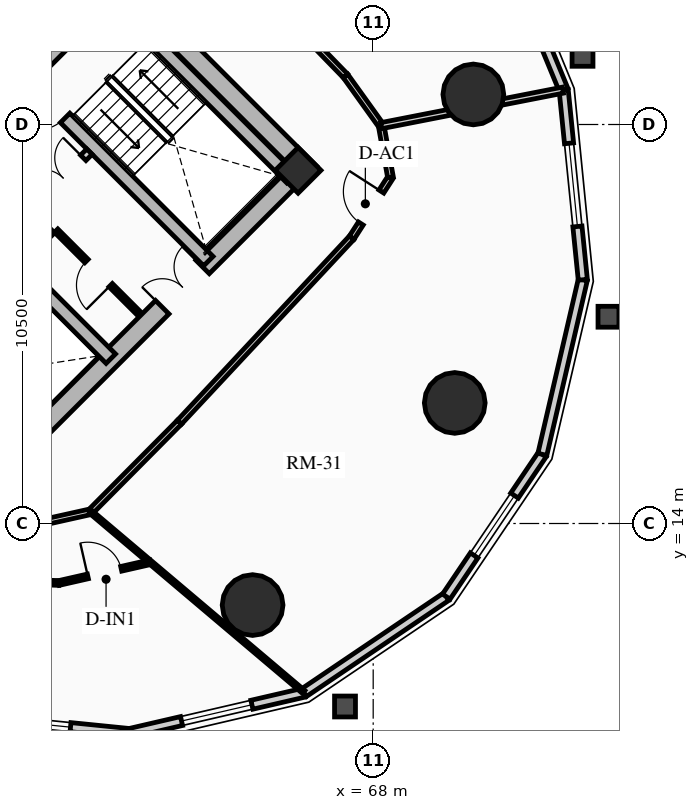
"""IFC4 building model, lengths in metres.
Left out: names, types, materials, properties, quantities, classifications, styles, units other than length and angle.
Written with IfcOpenShell. Run it as: python <this file> out.ifc"""

import sys

from ifc_helpers import new_model, si_unit, direction, frame, frame_2d, origin, origin_2d, place, context, subcontext, project, spatial, rectangle, circle, extrude, source, transform, mapped, element, fill, save


model = new_model("IFC4")
c1 = context("Model", 3, precision=1e-05, world=origin(), true_north=direction((0.0, 1.0)))
c2 = subcontext(c1, "Body", "Model", "MODEL_VIEW")
j1 = project(units=[si_unit("LENGTHUNIT", "METRE"), si_unit("PLANEANGLEUNIT", "RADIAN")], contexts=[c1])
p1 = place(None, origin())
s1 = spatial("IfcSite", under=j1, at=p1, CompositionType="ELEMENT")
p2 = place(p1, origin())
s2 = spatial("IfcBuilding", under=s1, at=p2, CompositionType="ELEMENT")
p3 = place(p2, frame((0.0, 0.0, 27.82)))
s3 = spatial("IfcBuildingStorey", under=s2, at=p3, CompositionType="ELEMENT", Elevation=27.82)
p4 = place(p3, frame((66.339, 23.227, 0.0), z_axis=(0.0, 0.0, 1.0), x_axis=(-0.707106781187, 0.707106781187, 0.0)))
e1 = element("IfcWall", 1, at=p4, inside=s3, PredefinedType="SHEAR", context=c2, shape_type="SweptSolid", body=[
    extrude(rectangle(XDim=14.3, YDim=0.5, at=frame_2d((7.15, 0.0))), origin(), (0.0, 0.0, 1.0), 2.91),
])
p5 = place(p3, frame((58.596, 15.838, 0.0), z_axis=(0.0, 0.0, 1.0), x_axis=(0.707106781187, 0.707106781187, 0.0)))
e2 = element("IfcWall", 2, at=p5, inside=s3, PredefinedType="SHEAR", context=c2, shape_type="SweptSolid", body=[
    extrude(rectangle(XDim=10.7, YDim=0.5, at=frame_2d((5.35, 0.0))), origin(), (0.0, 0.0, 1.0), 2.91),
])
m1 = source(origin(), c2, "Body", "SweptSolid", [
    extrude(rectangle(XDim=1.5, YDim=2.02, at=frame_2d((0.75, 1.01))), frame((0.0, 0.26, 0.0), z_axis=(0.0, -1.0, 0.0), x_axis=(1.0, 0.0, 0.0)), (0.0, 0.0, 1.0), 0.52),
])
p6 = place(p5, frame((5.45, 0.0, 0.0)))
e3 = element("IfcOpeningElement", 3, at=p6, cuts=e2, PredefinedType="OPENING", context=c2, shape_type="MappedRepresentation", body=[
    mapped(m1, transform((0.0, 0.0, 0.0), x_axis=(1.0, 0.0, 0.0), y_axis=(0.0, 1.0, 0.0), z_axis=(0.0, 0.0, 1.0), scale=1.0)),
])
p7 = place(p3, frame((61.096, 18.338, 0.0), z_axis=(0.0, 0.0, 1.0), x_axis=(-0.707106781187, 0.707106781187, 0.0)))
e4 = element("IfcWall", 4, at=p7, inside=s3, PredefinedType="SHEAR", context=c2, shape_type="SweptSolid", body=[
    extrude(rectangle(XDim=13.8, YDim=0.35, at=frame_2d((6.9, 0.0))), origin(), (0.0, 0.0, 1.0), 2.91),
])
m2 = source(origin(), c2, "Body", "SweptSolid", [
    extrude(rectangle(XDim=1.1, YDim=2.015, at=frame_2d((0.55, 1.007))), frame((0.0, 0.185, 0.0), z_axis=(0.0, -1.0, 0.0), x_axis=(1.0, 0.0, 0.0)), (0.0, 0.0, 1.0), 0.37),
])
p8 = place(p7, frame((4.9, 0.0, 0.0)))
e5 = element("IfcOpeningElement", 5, at=p8, cuts=e4, PredefinedType="OPENING", context=c2, shape_type="MappedRepresentation", body=[
    mapped(m2, transform((0.0, 0.0, 0.0), x_axis=(1.0, 0.0, 0.0), y_axis=(0.0, 1.0, 0.0), z_axis=(0.0, 0.0, 1.0), scale=1.0)),
])
m3 = source(origin(), c2, "Body", "SweptSolid", [
    extrude(rectangle(XDim=1.15, YDim=2.02, at=frame_2d((0.575, 1.01))), frame((0.0, 0.185, 0.0), z_axis=(0.0, -1.0, 0.0), x_axis=(1.0, 0.0, 0.0)), (0.0, 0.0, 1.0), 0.37),
])
p9 = place(p7, frame((7.32, 0.0, 0.0)))
e6 = element("IfcOpeningElement", 6, at=p9, cuts=e4, PredefinedType="OPENING", context=c2, shape_type="MappedRepresentation", body=[
    mapped(m3, transform((0.0, 0.0, 0.0), x_axis=(1.0, 0.0, 0.0), y_axis=(0.0, 1.0, 0.0), z_axis=(0.0, 0.0, 1.0), scale=1.0)),
])
p10 = place(p3, frame((63.662, 20.904, 0.0), z_axis=(0.0, 0.0, 1.0), x_axis=(-0.707106781187, 0.707106781187, 0.0)))
e7 = element("IfcWall", 7, at=p10, inside=s3, PredefinedType="SHEAR", context=c2, shape_type="SweptSolid", body=[
    extrude(rectangle(XDim=13.8, YDim=0.35, at=frame_2d((6.9, 0.0))), origin(), (0.0, 0.0, 1.0), 2.91),
])
p11 = place(p10, frame((10.025, 0.0, 0.0)))
e8 = element("IfcOpeningElement", 8, at=p11, cuts=e7, PredefinedType="OPENING", context=c2, shape_type="MappedRepresentation", body=[
    mapped(m2, transform((0.0, 0.0, 0.0), x_axis=(1.0, 0.0, 0.0), y_axis=(0.0, 1.0, 0.0), z_axis=(0.0, 0.0, 1.0), scale=1.0)),
])
p12 = place(p10, frame((12.025, 0.0, 0.0)))
e9 = element("IfcOpeningElement", 9, at=p12, cuts=e7, PredefinedType="OPENING", context=c2, shape_type="MappedRepresentation", body=[
    mapped(m2, transform((0.0, 0.0, 0.0), x_axis=(1.0, 0.0, 0.0), y_axis=(0.0, 1.0, 0.0), z_axis=(0.0, 0.0, 1.0), scale=1.0)),
])
p13 = place(p10, frame((5.33, 0.0, 0.0)))
e10 = element("IfcOpeningElement", 10, at=p13, cuts=e7, PredefinedType="OPENING", context=c2, shape_type="MappedRepresentation", body=[
    mapped(m3, transform((0.0, 0.0, 0.0), x_axis=(1.0, 0.0, 0.0), y_axis=(0.0, 1.0, 0.0), z_axis=(0.0, 0.0, 1.0), scale=1.0)),
])
p14 = place(p3, frame((65.847, 23.089, 0.0), z_axis=(0.0, 0.0, 1.0), x_axis=(-0.707106781187, 0.707106781187, 0.0)))
e11 = element("IfcWall", 11, at=p14, inside=s3, PredefinedType="SHEAR", context=c2, shape_type="SweptSolid", body=[
    extrude(rectangle(XDim=6.745, YDim=0.35, at=frame_2d((3.373, 0.0))), origin(), (0.0, 0.0, 1.0), 2.91),
])
p15 = place(p3, frame((58.893, 25.674, 0.0), z_axis=(0.0, 0.0, 1.0), x_axis=(0.707106781187, 0.707106781187, 0.0)))
e12 = element("IfcWall", 12, at=p15, inside=s3, PredefinedType="SHEAR", context=c2, shape_type="SweptSolid", body=[
    extrude(rectangle(XDim=3.285, YDim=0.35, at=frame_2d((1.643, 0.0))), origin(), (0.0, 0.0, 1.0), 2.91),
])
p16 = place(p3, frame((66.024, 23.294, 0.0), z_axis=(0.0, 0.0, 1.0), x_axis=(0.707106781187, 0.707106781187, 0.0)))
e13 = element("IfcColumn", 13, at=p16, inside=s3, PredefinedType="COLUMN", context=c2, shape_type="SweptSolid", body=[
    extrude(rectangle(XDim=0.85, YDim=0.85, at=origin_2d()), origin(), (0.0, 0.0, 1.0), 2.91),
])
for number, where, z_axis, x_axis in (
    (14, (64.827, 11.854, 0.0), (0.0, 0.0, 1.0), (1.0, 0.0, 0.0)),
    (15, (70.146, 17.173, 0.0), (0.0, 0.0, 1.0), (1.0, 0.0, 0.0)),
    (16, (70.635, 25.291, 0.0), (0.0, 0.0, 1.0), (1.0, 0.0, 0.0)),
):
    element("IfcColumn", number, at=place(p3, frame(where, z_axis=z_axis, x_axis=x_axis)), inside=s3, PredefinedType="USERDEFINED", context=c2, shape_type="SweptSolid", body=[
        extrude(circle(Radius=0.8, at=origin_2d()), origin(), (0.0, 0.0, 1.0), 2.91),
    ])
p17 = place(p3, frame((61.586, 8.484, 0.0), z_axis=(0.0, 0.0, 1.0), x_axis=(-0.994951574538, 0.100356187272, 0.0)))
e17 = element("IfcWall", 17, at=p17, inside=s3, PredefinedType="SOLIDWALL", context=c2, shape_type="SweptSolid", body=[
    extrude(rectangle(XDim=5.019, YDim=0.24, at=frame_2d((2.509, 0.0))), origin(), (0.0, 0.0, 1.0), 2.635),
])
m4 = source(origin(), c2, "Body", "SweptSolid", [
    extrude(rectangle(XDim=1.9, YDim=1.35, at=frame_2d((0.95, 0.675))), frame((0.0, 0.13, 0.0), z_axis=(0.0, -1.0, 0.0), x_axis=(1.0, 0.0, 0.0)), (0.0, 0.0, 1.0), 0.26),
])
p18 = place(p17, frame((1.559, 0.0, 0.65)))
e18 = element("IfcOpeningElement", 18, at=p18, cuts=e17, PredefinedType="OPENING", context=c2, shape_type="MappedRepresentation", body=[
    mapped(m4, transform((0.0, 0.0, 0.0), x_axis=(1.0, 0.0, 0.0), y_axis=(0.0, 1.0, 0.0), z_axis=(0.0, 0.0, 1.0), scale=1.0)),
])
p19 = place(p3, frame((66.18, 9.548, 0.0), z_axis=(0.0, 0.0, 1.0), x_axis=(-0.974197104074, -0.225698919833, 0.0)))
e19 = element("IfcWall", 19, at=p19, inside=s3, PredefinedType="SOLIDWALL", context=c2, shape_type="SweptSolid", body=[
    extrude(rectangle(XDim=4.715, YDim=0.24, at=frame_2d((2.357, 0.0))), origin(), (0.0, 0.0, 1.0), 2.635),
])
p20 = place(p19, frame((1.408, 0.0, 0.65)))
e20 = element("IfcOpeningElement", 20, at=p20, cuts=e19, PredefinedType="OPENING", context=c2, shape_type="MappedRepresentation", body=[
    mapped(m4, transform((0.0, 0.0, 0.0), x_axis=(1.0, 0.0, 0.0), y_axis=(0.0, 1.0, 0.0), z_axis=(0.0, 0.0, 1.0), scale=1.0)),
])
p21 = place(p3, frame((69.924, 12.076, 0.0), z_axis=(0.0, 0.0, 1.0), x_axis=(-0.828776615238, -0.559579594012, 0.0)))
e21 = element("IfcWall", 21, at=p21, inside=s3, PredefinedType="SOLIDWALL", context=c2, shape_type="SweptSolid", body=[
    extrude(rectangle(XDim=4.517, YDim=0.24, at=frame_2d((2.259, 0.0))), origin(), (0.0, 0.0, 1.0), 2.635),
])
p22 = place(p3, frame((72.452, 15.82, 0.0), z_axis=(0.0, 0.0, 1.0), x_axis=(-0.559579594012, -0.828776615238, 0.0)))
e22 = element("IfcWall", 22, at=p22, inside=s3, PredefinedType="SOLIDWALL", context=c2, shape_type="SweptSolid", body=[
    extrude(rectangle(XDim=4.517, YDim=0.24, at=frame_2d((2.259, 0.0))), origin(), (0.0, 0.0, 1.0), 2.635),
])
p23 = place(p22, frame((1.309, 0.0, 0.65)))
e23 = element("IfcOpeningElement", 23, at=p23, cuts=e22, PredefinedType="OPENING", context=c2, shape_type="MappedRepresentation", body=[
    mapped(m4, transform((0.0, 0.0, 0.0), x_axis=(1.0, 0.0, 0.0), y_axis=(0.0, 1.0, 0.0), z_axis=(0.0, 0.0, 1.0), scale=1.0)),
])
p24 = place(p3, frame((73.516, 20.414, 0.0), z_axis=(0.0, 0.0, 1.0), x_axis=(-0.225698919833, -0.974197104074, 0.0)))
e24 = element("IfcWall", 24, at=p24, inside=s3, PredefinedType="SOLIDWALL", context=c2, shape_type="SweptSolid", body=[
    extrude(rectangle(XDim=4.715, YDim=0.24, at=frame_2d((2.357, 0.0))), origin(), (0.0, 0.0, 1.0), 2.635),
])
p25 = place(p3, frame((73.012, 25.407, 0.0), z_axis=(0.0, 0.0, 1.0), x_axis=(0.100356187272, -0.994951574538, 0.0)))
e25 = element("IfcWall", 25, at=p25, inside=s3, PredefinedType="SOLIDWALL", context=c2, shape_type="SweptSolid", body=[
    extrude(rectangle(XDim=5.019, YDim=0.24, at=frame_2d((2.509, 0.0))), origin(), (0.0, 0.0, 1.0), 2.635),
])
m5 = source(origin(), c2, "Body", "SweptSolid", [
    extrude(rectangle(XDim=2.2, YDim=1.35, at=frame_2d((1.1, 0.675))), frame((0.0, 0.13, 0.0), z_axis=(0.0, -1.0, 0.0), x_axis=(1.0, 0.0, 0.0)), (0.0, 0.0, 1.0), 0.26),
])
p26 = place(p25, frame((1.409, 0.0, 0.65)))
e26 = element("IfcOpeningElement", 26, at=p26, cuts=e25, PredefinedType="OPENING", context=c2, shape_type="MappedRepresentation", body=[
    mapped(m5, transform((0.0, 0.0, 0.0), x_axis=(1.0, 0.0, 0.0), y_axis=(0.0, 1.0, 0.0), z_axis=(0.0, 0.0, 1.0), scale=1.0)),
])
p27 = place(p3, frame((70.99, 30.312, 0.0), z_axis=(0.0, 0.0, 1.0), x_axis=(0.381113147118, -0.924528403616, 0.0)))
e27 = element("IfcWall", 27, at=p27, inside=s3, PredefinedType="SOLIDWALL", context=c2, shape_type="SweptSolid", body=[
    extrude(rectangle(XDim=5.305, YDim=0.24, at=frame_2d((2.653, 0.0))), origin(), (0.0, 0.0, 1.0), 2.635),
])
p28 = place(p3, frame((58.214, 21.467, 0.0), z_axis=(0.0, 0.0, 1.0), x_axis=(0.707106781187, 0.707106781187, 0.0)))
e28 = element("IfcWall", 28, at=p28, inside=s3, PredefinedType="PARTITIONING", context=c2, shape_type="SweptSolid", body=[
    extrude(rectangle(XDim=3.28, YDim=0.2, at=frame_2d((1.64, 0.0))), origin(), (0.0, 0.0, 1.0), 2.635),
])
m6 = source(origin(), c2, "Body", "SweptSolid", [
    extrude(rectangle(XDim=1.5, YDim=2.02, at=frame_2d((0.75, 1.01))), frame((0.0, 0.11, 0.0), z_axis=(0.0, -1.0, 0.0), x_axis=(1.0, 0.0, 0.0)), (0.0, 0.0, 1.0), 0.22),
])
p29 = place(p28, frame((1.55, 0.0, 0.0)))
e29 = element("IfcOpeningElement", 29, at=p29, cuts=e28, PredefinedType="OPENING", context=c2, shape_type="MappedRepresentation", body=[
    mapped(m6, transform((0.0, 0.0, 0.0), x_axis=(1.0, 0.0, 0.0), y_axis=(0.0, 1.0, 0.0), z_axis=(0.0, 0.0, 1.0), scale=1.0)),
])
p30 = place(p3, frame((61.835, 19.529, 0.0), z_axis=(0.0, 0.0, 1.0), x_axis=(-0.707146413884, 0.707067146267, 0.0)))
e30 = element("IfcWall", 30, at=p30, inside=s3, PredefinedType="PARTITIONING", context=c2, shape_type="SweptSolid", body=[
    extrude(rectangle(XDim=3.08, YDim=0.125, at=frame_2d((1.54, 0.0))), origin(), (0.0, 0.0, 1.0), 2.635),
])
m7 = source(origin(), c2, "Body", "SweptSolid", [
    extrude(rectangle(XDim=0.9, YDim=2.005, at=frame_2d((0.45, 1.002))), frame((0.0, 0.073, 0.0), z_axis=(0.0, -1.0, 0.0), x_axis=(1.0, 0.0, 0.0)), (0.0, 0.0, 1.0), 0.145),
])
p31 = place(p30, frame((1.05, 0.0, 0.0)))
e31 = element("IfcOpeningElement", 31, at=p31, cuts=e30, PredefinedType="OPENING", context=c2, shape_type="MappedRepresentation", body=[
    mapped(m7, transform((0.0, 0.0, 0.0), x_axis=(1.0, 0.0, 0.0), y_axis=(0.0, 1.0, 0.0), z_axis=(0.0, 0.0, 1.0), scale=1.0)),
])
p32 = place(p3, frame((58.794, 20.915, 0.0), z_axis=(0.0, 0.0, 1.0), x_axis=(0.707106781187, 0.707106781187, 0.0)))
e32 = element("IfcWall", 32, at=p32, inside=s3, PredefinedType="PARTITIONING", context=c2, shape_type="SweptSolid", body=[
    extrude(rectangle(XDim=1.1, YDim=0.125, at=frame_2d((0.55, 0.0))), origin(), (0.0, 0.0, 1.0), 2.635),
])
p33 = place(p3, frame((59.008, 13.963, 0.0), z_axis=(0.0, 0.0, 1.0), x_axis=(0.976020856791, 0.21767702476, 0.0)))
e33 = element("IfcWall", 33, at=p33, inside=s3, PredefinedType="PARTITIONING", context=c2, shape_type="SweptSolid", body=[
    extrude(rectangle(XDim=1.593, YDim=0.15, at=frame_2d((0.796, 0.0))), origin(), (0.0, 0.0, 1.0), 2.205),
])
p34 = place(p3, frame((60.562, 14.31, 0.0), z_axis=(0.0, 0.0, 1.0), x_axis=(0.704566236161, 0.709638230975, 0.0)))
e34 = element("IfcWall", 34, at=p34, inside=s3, PredefinedType="PARTITIONING", context=c2, shape_type="SweptSolid", body=[
    extrude(rectangle(XDim=3.321, YDim=0.15, at=frame_2d((1.661, 0.0))), origin(), (0.0, 0.0, 1.0), 2.159),
])
p35 = place(p3, frame((62.903, 16.667, 0.0), z_axis=(0.0, 0.0, 1.0), x_axis=(0.682371947497, 0.731005147225, 0.0)))
e35 = element("IfcWall", 35, at=p35, inside=s3, PredefinedType="PARTITIONING", context=c2, shape_type="SweptSolid", body=[
    extrude(rectangle(XDim=6.642, YDim=0.15, at=frame_2d((3.321, 0.0))), origin(), (0.0, 0.0, 1.0), 2.159),
])
p36 = place(p3, frame((67.435, 21.521, 0.0), z_axis=(0.0, 0.0, 1.0), x_axis=(0.540777197838, 0.841165870859, 0.0)))
e36 = element("IfcWall", 36, at=p36, inside=s3, PredefinedType="PARTITIONING", context=c2, shape_type="SweptSolid", body=[
    extrude(rectangle(XDim=1.888, YDim=0.15, at=frame_2d((0.944, 0.0))), origin(), (0.0, 0.0, 1.0), 2.205),
])
m8 = source(origin(), c2, "Body", "SweptSolid", [
    extrude(rectangle(XDim=1.0, YDim=2.015, at=frame_2d((0.5, 1.007))), frame((0.0, 0.085, 0.0), z_axis=(0.0, -1.0, 0.0), x_axis=(1.0, 0.0, 0.0)), (0.0, 0.0, 1.0), 0.17),
])
p37 = place(p36, frame((0.444, 0.0, 0.0)))
e37 = element("IfcOpeningElement", 37, at=p37, cuts=e36, PredefinedType="OPENING", context=c2, shape_type="MappedRepresentation", body=[
    mapped(m8, transform((0.0, 0.0, 0.0), x_axis=(1.0, 0.0, 0.0), y_axis=(0.0, 1.0, 0.0), z_axis=(0.0, 0.0, 1.0), scale=1.0)),
])
p38 = place(p3, frame((68.456, 23.11, 0.0), z_axis=(0.0, 0.0, 1.0), x_axis=(-0.1772522795, 0.984165448191, 0.0)))
e38 = element("IfcWall", 38, at=p38, inside=s3, PredefinedType="PARTITIONING", context=c2, shape_type="SweptSolid", body=[
    extrude(rectangle(XDim=1.382, YDim=0.15, at=frame_2d((0.691, 0.0))), origin(), (0.0, 0.0, 1.0), 2.159),
])
p39 = place(p3, frame((68.211, 24.469, 0.0), z_axis=(0.0, 0.0, 1.0), x_axis=(-0.583012141368, 0.812463441034, 0.0)))
e39 = element("IfcWall", 39, at=p39, inside=s3, PredefinedType="PARTITIONING", context=c2, shape_type="SweptSolid", body=[
    extrude(rectangle(XDim=1.613, YDim=0.15, at=frame_2d((0.807, 0.0))), origin(), (0.0, 0.0, 1.0), 2.205),
])
p40 = place(p3, frame((67.27, 25.78, 0.0), z_axis=(0.0, 0.0, 1.0), x_axis=(-0.696847842907, 0.717218992942, 0.0)))
e40 = element("IfcWall", 40, at=p40, inside=s3, PredefinedType="PARTITIONING", context=c2, shape_type="SweptSolid", body=[
    extrude(rectangle(XDim=6.004, YDim=0.15, at=frame_2d((3.002, 0.0))), origin(), (0.0, 0.0, 1.0), 2.635),
])
p41 = place(p3, frame((60.562, 14.31, 0.0), z_axis=(0.0, 0.0, 1.0), x_axis=(0.763547638675, -0.645751502881, 0.0)))
e41 = element("IfcWall", 41, at=p41, inside=s3, PredefinedType="MOVABLE", context=c2, shape_type="SweptSolid", body=[
    extrude(rectangle(XDim=7.345, YDim=0.1, at=frame_2d((3.673, 0.0))), origin(), (0.0, 0.0, 1.0), 2.073),
])
p42 = place(p3, frame((68.211, 24.469, 0.0), z_axis=(0.0, 0.0, 1.0), x_axis=(0.981421381452, 0.19186472325, 0.0)))
e42 = element("IfcWall", 42, at=p42, inside=s3, PredefinedType="PARTITIONING", context=c2, shape_type="SweptSolid", body=[
    extrude(rectangle(XDim=4.872, YDim=0.16, at=frame_2d((2.436, 0.0))), origin(), (0.0, 0.0, 1.0), 2.073),
])
p43 = place(p3, frame((57.255, 12.528, 0.0), z_axis=(0.0, 0.0, 1.0), x_axis=(0.999290303909, -0.037668136579, 0.0)))
e43 = element("IfcWall", 43, at=p43, inside=s3, PredefinedType="PARTITIONING", context=c2, shape_type="SweptSolid", body=[
    extrude(rectangle(XDim=2.476, YDim=0.125, at=frame_2d((1.238, 0.0))), origin(), (0.0, 0.0, 1.0), 2.159),
])
p44 = place(p3, frame((59.729, 12.434, 0.0), z_axis=(0.0, 0.0, 1.0), x_axis=(0.975062765266, 0.221929276555, 0.0)))
e44 = element("IfcWall", 44, at=p44, inside=s3, PredefinedType="PARTITIONING", context=c2, shape_type="SweptSolid", body=[
    extrude(rectangle(XDim=2.465, YDim=0.125, at=frame_2d((1.233, 0.0))), origin(), (0.0, 0.0, 1.0), 2.205),
])
p45 = place(p44, frame((0.783, 0.0, 0.0)))
e45 = element("IfcOpeningElement", 45, at=p45, cuts=e44, PredefinedType="OPENING", context=c2, shape_type="MappedRepresentation", body=[
    mapped(m7, transform((0.0, 0.0, 0.0), x_axis=(1.0, 0.0, 0.0), y_axis=(0.0, 1.0, 0.0), z_axis=(0.0, 0.0, 1.0), scale=1.0)),
])
m9 = source(origin(), c2, "Body", "SweptSolid", [
    extrude(rectangle(XDim=1.9, YDim=1.35, at=frame_2d((0.95, 0.675))), frame((0.0, 0.03, 0.0), z_axis=(0.0, -1.0, 0.0), x_axis=(1.0, 0.0, 0.0)), (0.0, 0.0, 1.0), 0.06),
])
p46 = place(p18, origin())
e46 = element("IfcWindow", 46, at=p46, inside=s3, PartitioningType="DOUBLE_PANEL_VERTICAL", PredefinedType="WINDOW", context=c2, shape_type="MappedRepresentation", body=[
    mapped(m9, transform((0.0, 0.0, 0.0), x_axis=(1.0, 0.0, 0.0), y_axis=(0.0, 1.0, 0.0), z_axis=(0.0, 0.0, 1.0), scale=1.0)),
])
fill(e18, e46)
p47 = place(p20, origin())
e47 = element("IfcWindow", 47, at=p47, inside=s3, PartitioningType="DOUBLE_PANEL_VERTICAL", PredefinedType="WINDOW", context=c2, shape_type="MappedRepresentation", body=[
    mapped(m9, transform((0.0, 0.0, 0.0), x_axis=(1.0, 0.0, 0.0), y_axis=(0.0, 1.0, 0.0), z_axis=(0.0, 0.0, 1.0), scale=1.0)),
])
fill(e20, e47)
p48 = place(p23, origin())
e48 = element("IfcWindow", 48, at=p48, inside=s3, PartitioningType="DOUBLE_PANEL_VERTICAL", PredefinedType="WINDOW", context=c2, shape_type="MappedRepresentation", body=[
    mapped(m9, transform((0.0, 0.0, 0.0), x_axis=(1.0, 0.0, 0.0), y_axis=(0.0, 1.0, 0.0), z_axis=(0.0, 0.0, 1.0), scale=1.0)),
])
fill(e23, e48)
m10 = source(origin(), c2, "Body", "SweptSolid", [
    extrude(rectangle(XDim=2.2, YDim=1.35, at=frame_2d((1.1, 0.675))), frame((0.0, 0.03, 0.0), z_axis=(0.0, -1.0, 0.0), x_axis=(1.0, 0.0, 0.0)), (0.0, 0.0, 1.0), 0.06),
])
p49 = place(p26, origin())
e49 = element("IfcWindow", 49, at=p49, inside=s3, PartitioningType="DOUBLE_PANEL_VERTICAL", PredefinedType="WINDOW", context=c2, shape_type="MappedRepresentation", body=[
    mapped(m10, transform((0.0, 0.0, 0.0), x_axis=(1.0, 0.0, 0.0), y_axis=(0.0, 1.0, 0.0), z_axis=(0.0, 0.0, 1.0), scale=1.0)),
])
fill(e26, e49)
m11 = source(origin(), c2, "Body", "SweptSolid", [
    extrude(rectangle(XDim=1.15, YDim=2.02, at=frame_2d((0.575, 1.01))), frame((0.0, 0.025, 0.0), z_axis=(0.0, -1.0, 0.0), x_axis=(1.0, 0.0, 0.0)), (0.0, 0.0, 1.0), 0.05),
])
p50 = place(p13, origin())
e50 = element("IfcDoor", 50, at=p50, inside=s3, OperationType="SINGLE_SWING_RIGHT", PredefinedType="DOOR", context=c2, shape_type="MappedRepresentation", body=[
    mapped(m11, transform((0.0, 0.0, 0.0), x_axis=(1.0, 0.0, 0.0), y_axis=(0.0, 1.0, 0.0), z_axis=(0.0, 0.0, 1.0), scale=1.0)),
])
fill(e10, e50)
m12 = source(origin(), c2, "Body", "SweptSolid", [
    extrude(rectangle(XDim=1.5, YDim=2.02, at=frame_2d((0.75, 1.01))), frame((0.0, 0.025, 0.0), z_axis=(0.0, -1.0, 0.0), x_axis=(1.0, 0.0, 0.0)), (0.0, 0.0, 1.0), 0.05),
])
p51 = place(p6, origin())
e51 = element("IfcDoor", 51, at=p51, inside=s3, OperationType="DOUBLE_DOOR_SINGLE_SWING", PredefinedType="DOOR", context=c2, shape_type="MappedRepresentation", body=[
    mapped(m12, transform((0.0, 0.0, 0.0), x_axis=(1.0, 0.0, 0.0), y_axis=(0.0, 1.0, 0.0), z_axis=(0.0, 0.0, 1.0), scale=1.0)),
])
fill(e3, e51)
p52 = place(p29, origin())
e52 = element("IfcDoor", 52, at=p52, inside=s3, OperationType="DOUBLE_DOOR_SINGLE_SWING", PredefinedType="DOOR", context=c2, shape_type="MappedRepresentation", body=[
    mapped(m12, transform((0.0, 0.0, 0.0), x_axis=(1.0, 0.0, 0.0), y_axis=(0.0, 1.0, 0.0), z_axis=(0.0, 0.0, 1.0), scale=1.0)),
])
fill(e29, e52)
m13 = source(origin(), c2, "Body", "SweptSolid", [
    extrude(rectangle(XDim=0.9, YDim=2.005, at=frame_2d((0.45, 1.002))), frame((0.0, 0.025, 0.0), z_axis=(0.0, -1.0, 0.0), x_axis=(1.0, 0.0, 0.0)), (0.0, 0.0, 1.0), 0.05),
])
p53 = place(p31, origin())
e53 = element("IfcDoor", 53, at=p53, inside=s3, OperationType="SINGLE_SWING_LEFT", PredefinedType="DOOR", context=c2, shape_type="MappedRepresentation", body=[
    mapped(m13, transform((0.0, 0.0, 0.0), x_axis=(1.0, 0.0, 0.0), y_axis=(0.0, 1.0, 0.0), z_axis=(0.0, 0.0, 1.0), scale=1.0)),
])
fill(e31, e53)
p54 = place(p45, origin())
e54 = element("IfcDoor", 54, at=p54, inside=s3, OperationType="SINGLE_SWING_LEFT", PredefinedType="DOOR", context=c2, shape_type="MappedRepresentation", body=[
    mapped(m13, transform((0.0, 0.0, 0.0), x_axis=(1.0, 0.0, 0.0), y_axis=(0.0, 1.0, 0.0), z_axis=(0.0, 0.0, 1.0), scale=1.0)),
])
fill(e45, e54)
m14 = source(origin(), c2, "Body", "SweptSolid", [
    extrude(rectangle(XDim=1.0, YDim=2.015, at=frame_2d((0.5, 1.007))), frame((0.0, 0.025, 0.0), z_axis=(0.0, -1.0, 0.0), x_axis=(1.0, 0.0, 0.0)), (0.0, 0.0, 1.0), 0.05),
])
p55 = place(p37, origin())
e55 = element("IfcDoor", 55, at=p55, inside=s3, OperationType="SINGLE_SWING_RIGHT", PredefinedType="DOOR", context=c2, shape_type="MappedRepresentation", body=[
    mapped(m14, transform((0.0, 0.0, 0.0), x_axis=(1.0, 0.0, 0.0), y_axis=(0.0, 1.0, 0.0), z_axis=(0.0, 0.0, 1.0), scale=1.0)),
])
fill(e37, e55)
save(model, sys.argv[1])
